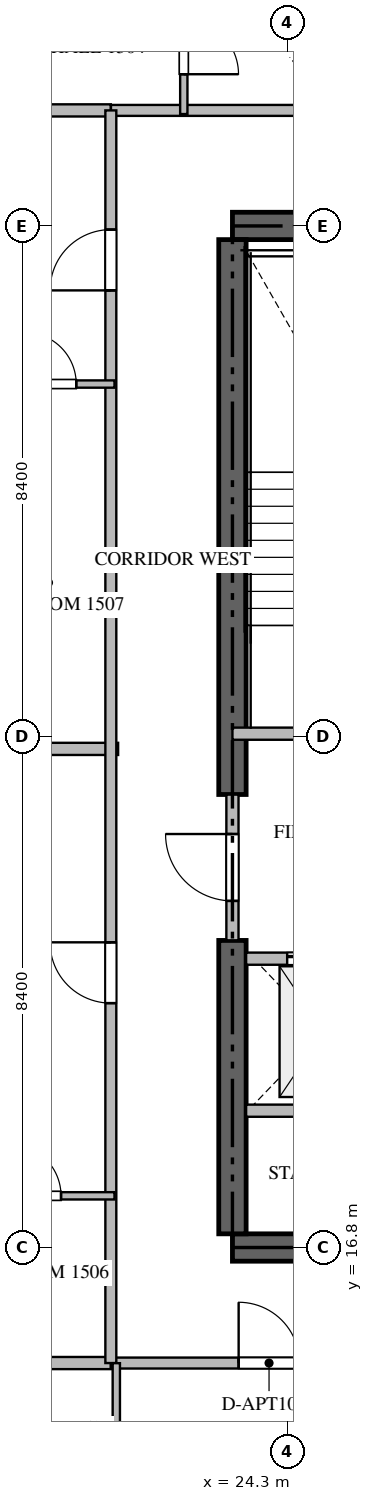
"""IFC4 building model, lengths in metres.
Left out: names, types, materials, properties, quantities, classifications, styles, units other than length and angle.
Written with IfcOpenShell. Run it as: python <this file> out.ifc"""

import sys

from ifc_helpers import new_model, si_unit, direction, frame, frame_2d, origin, place, context, subcontext, project, spatial, rectangle, extrude, source, transform, mapped, element, fill, save


model = new_model("IFC4")
c1 = context("Model", 3, precision=1e-05, world=origin(), true_north=direction((0.0, 1.0)))
c2 = subcontext(c1, "Body", "Model", "MODEL_VIEW")
j1 = project(units=[si_unit("LENGTHUNIT", "METRE"), si_unit("PLANEANGLEUNIT", "RADIAN")], contexts=[c1])
p1 = place(None, origin())
s1 = spatial("IfcSite", under=j1, at=p1, CompositionType="ELEMENT")
p2 = place(p1, origin())
s2 = spatial("IfcBuilding", under=s1, at=p2, CompositionType="ELEMENT")
p3 = place(p2, frame((0.0, 0.0, 64.2)))
s3 = spatial("IfcBuildingStorey", under=s2, at=p3, CompositionType="ELEMENT", Elevation=64.2)
for number, where, z_axis, x_axis in (
    (1, (23.4, 16.8, -0.26), (0.0, 0.0, 1.0), (1.0, 0.0, 0.0)),
    (2, (41.4, 33.6, -0.26), (0.0, 0.0, 1.0), (-1.0, 0.0, 0.0)),
):
    element("IfcWall", number, at=place(p3, frame(where, z_axis=z_axis, x_axis=x_axis)), inside=s3, PredefinedType="SHEAR", context=c2, shape_type="SweptSolid", body=[
        extrude(rectangle(XDim=18.0, YDim=0.45, at=frame_2d((9.0, 0.0))), origin(), (0.0, 0.0, 1.0), 3.748),
    ])
p4 = place(p3, frame((23.4, 17.025, -0.26), z_axis=(0.0, 0.0, 1.0), x_axis=(0.0, 1.0, 0.0)))
e3 = element("IfcWall", 3, at=p4, inside=s3, PredefinedType="SHEAR", context=c2, shape_type="SweptSolid", body=[
    extrude(rectangle(XDim=4.825, YDim=0.45, at=frame_2d((2.413, 0.0))), origin(), (0.0, 0.0, 1.0), 3.748),
])
p5 = place(p3, frame((23.4, 24.25, -0.26), z_axis=(0.0, 0.0, 1.0), x_axis=(0.0, 1.0, 0.0)))
e4 = element("IfcWall", 4, at=p5, inside=s3, PredefinedType="SHEAR", context=c2, shape_type="SweptSolid", body=[
    extrude(rectangle(XDim=9.125, YDim=0.45, at=frame_2d((4.562, 0.0))), origin(), (0.0, 0.0, 1.0), 3.748),
])
p6 = place(p3, frame((23.4, 25.25, 0.0), z_axis=(0.0, 0.0, 1.0), x_axis=(1.0, 0.0, 0.0)))
e5 = element("IfcWall", 5, at=p6, inside=s3, PredefinedType="STANDARD", context=c2, shape_type="SweptSolid", body=[
    extrude(rectangle(XDim=4.45, YDim=0.2, at=frame_2d((2.225, 0.0))), origin(), (0.0, 0.0, 1.0), 3.49),
])
p7 = place(p6, frame((1.65, 0.0, 0.0)))
e6 = element("IfcOpeningElement", 6, at=p7, cuts=e5, PredefinedType="OPENING", context=c2, shape_type="SweptSolid", body=[
    extrude(rectangle(XDim=1.1, YDim=2.15, at=frame_2d((0.55, 1.075))), frame((0.0, 0.11, 0.0), z_axis=(0.0, -1.0, 0.0), x_axis=(1.0, 0.0, 0.0)), (0.0, 0.0, 1.0), 0.22),
])
p8 = place(p3, frame((23.625, 21.55, 0.0), z_axis=(0.0, 0.0, 1.0), x_axis=(1.0, 0.0, 0.0)))
e7 = element("IfcWall", 7, at=p8, inside=s3, PredefinedType="STANDARD", context=c2, shape_type="SweptSolid", body=[
    extrude(rectangle(XDim=2.425, YDim=0.2, at=frame_2d((1.212, 0.0))), origin(), (0.0, 0.0, 1.0), 3.49),
])
p9 = place(p8, frame((0.675, 0.0, 0.0)))
e8 = element("IfcOpeningElement", 8, at=p9, cuts=e7, PredefinedType="OPENING", context=c2, shape_type="SweptSolid", body=[
    extrude(rectangle(XDim=1.2, YDim=2.2, at=frame_2d((0.6, 1.1))), frame((0.0, 0.11, 0.0), z_axis=(0.0, -1.0, 0.0), x_axis=(1.0, 0.0, 0.0)), (0.0, 0.0, 1.0), 0.22),
])
p10 = place(p3, frame((23.625, 19.05, 0.0), z_axis=(0.0, 0.0, 1.0), x_axis=(1.0, 0.0, 0.0)))
e9 = element("IfcWall", 9, at=p10, inside=s3, PredefinedType="STANDARD", context=c2, shape_type="SweptSolid", body=[
    extrude(rectangle(XDim=2.425, YDim=0.2, at=frame_2d((1.212, 0.0))), origin(), (0.0, 0.0, 1.0), 3.49),
])
p11 = place(p3, frame((23.4, 21.852, 0.0), z_axis=(0.0, 0.0, 1.0), x_axis=(0.0, 1.0, 0.0)))
e10 = element("IfcWall", 10, at=p11, inside=s3, PredefinedType="STANDARD", context=c2, shape_type="SweptSolid", body=[
    extrude(rectangle(XDim=2.396, YDim=0.2, at=frame_2d((1.198, 0.0))), origin(), (0.0, 0.0, 1.0), 3.49),
])
p12 = place(p11, frame((0.648, 0.0, 0.0)))
e11 = element("IfcOpeningElement", 11, at=p12, cuts=e10, PredefinedType="OPENING", context=c2, shape_type="SweptSolid", body=[
    extrude(rectangle(XDim=1.1, YDim=2.15, at=frame_2d((0.55, 1.075))), frame((0.0, 0.11, 0.0), z_axis=(0.0, -1.0, 0.0), x_axis=(1.0, 0.0, 0.0)), (0.0, 0.0, 1.0), 0.22),
])
p13 = place(p3, frame((6.082, 25.0, 0.0), z_axis=(0.0, 0.0, 1.0), x_axis=(1.0, 0.0, 0.0)))
e12 = element("IfcWall", 12, at=p13, inside=s3, PredefinedType="PARTITIONING", context=c2, shape_type="SweptSolid", body=[
    extrude(rectangle(XDim=15.438, YDim=0.2, at=frame_2d((7.719, 0.0))), origin(), (0.0, 0.0, 1.0), 3.49),
])
for number, where, z_axis, x_axis in (
    (13, (6.082, 14.9, 0.0), (0.0, 0.0, 1.0), (1.0, 0.0, 0.0)),
    (14, (6.082, 35.5, 0.0), (0.0, 0.0, 1.0), (1.0, 0.0, 0.0)),
):
    element("IfcWall", number, at=place(p3, frame(where, z_axis=z_axis, x_axis=x_axis)), inside=s3, PredefinedType="PARTITIONING", context=c2, shape_type="SweptSolid", body=[
        extrude(rectangle(XDim=15.318, YDim=0.2, at=frame_2d((7.659, 0.0))), origin(), (0.0, 0.0, 1.0), 3.49),
    ])
p14 = place(p3, frame((21.402, 14.9, 0.0), z_axis=(0.0, 0.0, 1.0), x_axis=(1.0, 0.0, 0.0)))
e15 = element("IfcWall", 15, at=p14, inside=s3, PredefinedType="PARTITIONING", context=c2, shape_type="SweptSolid", body=[
    extrude(rectangle(XDim=21.996, YDim=0.18, at=frame_2d((10.998, 0.0))), origin(), (0.0, 0.0, 1.0), 3.49),
])
p15 = place(p14, frame((2.1, 0.0, 0.0)))
e16 = element("IfcOpeningElement", 16, at=p15, cuts=e15, PredefinedType="OPENING", context=c2, shape_type="SweptSolid", body=[
    extrude(rectangle(XDim=1.0, YDim=2.15, at=frame_2d((0.5, 1.075))), frame((0.0, 0.1, 0.0), z_axis=(0.0, -1.0, 0.0), x_axis=(1.0, 0.0, 0.0)), (0.0, 0.0, 1.0), 0.2),
])
p16 = place(p14, frame((6.719, 0.0, 0.0)))
e17 = element("IfcOpeningElement", 17, at=p16, cuts=e15, PredefinedType="OPENING", context=c2, shape_type="SweptSolid", body=[
    extrude(rectangle(XDim=1.0, YDim=2.15, at=frame_2d((0.5, 1.075))), frame((0.0, 0.1, 0.0), z_axis=(0.0, -1.0, 0.0), x_axis=(1.0, 0.0, 0.0)), (0.0, 0.0, 1.0), 0.2),
])
p17 = place(p14, frame((18.896, 0.0, 0.0)))
e18 = element("IfcOpeningElement", 18, at=p17, cuts=e15, PredefinedType="OPENING", context=c2, shape_type="SweptSolid", body=[
    extrude(rectangle(XDim=1.0, YDim=2.15, at=frame_2d((0.5, 1.075))), frame((0.0, 0.1, 0.0), z_axis=(0.0, -1.0, 0.0), x_axis=(1.0, 0.0, 0.0)), (0.0, 0.0, 1.0), 0.2),
])
p18 = place(p3, frame((21.402, 35.5, 0.0), z_axis=(0.0, 0.0, 1.0), x_axis=(1.0, 0.0, 0.0)))
e19 = element("IfcWall", 19, at=p18, inside=s3, PredefinedType="PARTITIONING", context=c2, shape_type="SweptSolid", body=[
    extrude(rectangle(XDim=21.996, YDim=0.18, at=frame_2d((10.998, 0.0))), origin(), (0.0, 0.0, 1.0), 3.49),
])
p19 = place(p18, frame((6.425, 0.0, 0.0)))
e20 = element("IfcOpeningElement", 20, at=p19, cuts=e19, PredefinedType="OPENING", context=c2, shape_type="SweptSolid", body=[
    extrude(rectangle(XDim=1.0, YDim=2.15, at=frame_2d((0.5, 1.075))), frame((0.0, 0.1, 0.0), z_axis=(0.0, -1.0, 0.0), x_axis=(1.0, 0.0, 0.0)), (0.0, 0.0, 1.0), 0.2),
])
p20 = place(p18, frame((13.605, 0.0, 0.0)))
e21 = element("IfcOpeningElement", 21, at=p20, cuts=e19, PredefinedType="OPENING", context=c2, shape_type="SweptSolid", body=[
    extrude(rectangle(XDim=1.0, YDim=2.15, at=frame_2d((0.5, 1.075))), frame((0.0, 0.1, 0.0), z_axis=(0.0, -1.0, 0.0), x_axis=(1.0, 0.0, 0.0)), (0.0, 0.0, 1.0), 0.2),
])
p21 = place(p3, frame((21.4, 14.9, 0.0), z_axis=(0.0, 0.0, 1.0), x_axis=(0.0, 1.0, 0.0)))
e22 = element("IfcWall", 22, at=p21, inside=s3, PredefinedType="PARTITIONING", context=c2, shape_type="SweptSolid", body=[
    extrude(rectangle(XDim=20.6, YDim=0.18, at=frame_2d((10.3, 0.0))), origin(), (0.0, 0.0, 1.0), 3.49),
])
p22 = place(p21, frame((5.919, 0.0, 0.0)))
e23 = element("IfcOpeningElement", 23, at=p22, cuts=e22, PredefinedType="OPENING", context=c2, shape_type="SweptSolid", body=[
    extrude(rectangle(XDim=1.0, YDim=2.15, at=frame_2d((0.5, 1.075))), frame((0.0, 0.1, 0.0), z_axis=(0.0, -1.0, 0.0), x_axis=(1.0, 0.0, 0.0)), (0.0, 0.0, 1.0), 0.2),
])
p23 = place(p21, frame((17.64, 0.0, 0.0)))
e24 = element("IfcOpeningElement", 24, at=p23, cuts=e22, PredefinedType="OPENING", context=c2, shape_type="SweptSolid", body=[
    extrude(rectangle(XDim=1.0, YDim=2.15, at=frame_2d((0.5, 1.075))), frame((0.0, 0.1, 0.0), z_axis=(0.0, -1.0, 0.0), x_axis=(1.0, 0.0, 0.0)), (0.0, 0.0, 1.0), 0.2),
])
p24 = place(p3, frame((21.49, 12.15, 0.0), z_axis=(0.0, 0.0, 1.0), x_axis=(0.0, 1.0, 0.0)))
e25 = element("IfcWall", 25, at=p24, inside=s3, PredefinedType="PARTITIONING", context=c2, shape_type="SweptSolid", body=[
    extrude(rectangle(XDim=2.748, YDim=0.12, at=frame_2d((1.374, 0.0))), origin(), (0.0, 0.0, 1.0), 3.49),
])
p25 = place(p3, frame((22.6, 37.65, 0.0), z_axis=(0.0, 0.0, 1.0), x_axis=(0.0, -1.0, 0.0)))
e26 = element("IfcWall", 26, at=p25, inside=s3, PredefinedType="PARTITIONING", context=c2, shape_type="SweptSolid", body=[
    extrude(rectangle(XDim=2.21, YDim=0.12, at=frame_2d((1.105, 0.0))), origin(), (0.0, 0.0, 1.0), 3.49),
])
p26 = place(p25, frame((0.655, 0.0, 0.0)))
e27 = element("IfcOpeningElement", 27, at=p26, cuts=e26, PredefinedType="OPENING", context=c2, shape_type="SweptSolid", body=[
    extrude(rectangle(XDim=0.9, YDim=2.1, at=frame_2d((0.45, 1.05))), frame((0.0, 0.07, 0.0), z_axis=(0.0, -1.0, 0.0), x_axis=(1.0, 0.0, 0.0)), (0.0, 0.0, 1.0), 0.14),
])
p27 = place(p3, frame((18.852, 17.65, 0.0), z_axis=(0.0, 0.0, 1.0), x_axis=(1.0, 0.0, 0.0)))
e28 = element("IfcWall", 28, at=p27, inside=s3, PredefinedType="PARTITIONING", context=c2, shape_type="SweptSolid", body=[
    extrude(rectangle(XDim=2.608, YDim=0.12, at=frame_2d((1.304, 0.0))), origin(), (0.0, 0.0, 1.0), 3.49),
])
p28 = place(p27, frame((0.879, 0.0, 0.0)))
e29 = element("IfcOpeningElement", 29, at=p28, cuts=e28, PredefinedType="OPENING", context=c2, shape_type="SweptSolid", body=[
    extrude(rectangle(XDim=0.85, YDim=2.1, at=frame_2d((0.425, 1.05))), frame((0.0, 0.07, 0.0), z_axis=(0.0, -1.0, 0.0), x_axis=(1.0, 0.0, 0.0)), (0.0, 0.0, 1.0), 0.14),
])
p29 = place(p3, frame((19.352, 31.0, 0.0), z_axis=(0.0, 0.0, 1.0), x_axis=(1.0, 0.0, 0.0)))
e30 = element("IfcWall", 30, at=p29, inside=s3, PredefinedType="PARTITIONING", context=c2, shape_type="SweptSolid", body=[
    extrude(rectangle(XDim=2.108, YDim=0.12, at=frame_2d((1.054, 0.0))), origin(), (0.0, 0.0, 1.0), 3.49),
])
p30 = place(p29, frame((0.629, 0.0, 0.0)))
e31 = element("IfcOpeningElement", 31, at=p30, cuts=e30, PredefinedType="OPENING", context=c2, shape_type="SweptSolid", body=[
    extrude(rectangle(XDim=0.85, YDim=2.1, at=frame_2d((0.425, 1.05))), frame((0.0, 0.07, 0.0), z_axis=(0.0, -1.0, 0.0), x_axis=(1.0, 0.0, 0.0)), (0.0, 0.0, 1.0), 0.14),
])
m1 = source(origin(), c2, "Body", "SweptSolid", [
    extrude(rectangle(XDim=1.2, YDim=2.2, at=frame_2d((0.6, 1.1))), frame((0.0, 0.025, 0.0), z_axis=(0.0, -1.0, 0.0), x_axis=(1.0, 0.0, 0.0)), (0.0, 0.0, 1.0), 0.05),
])
p31 = place(p9, origin())
e32 = element("IfcDoor", 32, at=p31, inside=s3, OperationType="DOUBLE_DOOR_SLIDING", PredefinedType="DOOR", context=c2, shape_type="MappedRepresentation", body=[
    mapped(m1, transform((0.0, 0.0, 0.0), scale=1.0)),
])
fill(e8, e32)
m2 = source(origin(), c2, "Body", "SweptSolid", [
    extrude(rectangle(XDim=1.1, YDim=2.15, at=frame_2d((0.55, 1.075))), frame((0.0, 0.025, 0.0), z_axis=(0.0, -1.0, 0.0), x_axis=(1.0, 0.0, 0.0)), (0.0, 0.0, 1.0), 0.05),
])
p32 = place(p12, origin())
e33 = element("IfcDoor", 33, at=p32, inside=s3, OperationType="SINGLE_SWING_RIGHT", PredefinedType="DOOR", context=c2, shape_type="MappedRepresentation", body=[
    mapped(m2, transform((0.0, 0.0, 0.0), scale=1.0)),
])
fill(e11, e33)
m3 = source(origin(), c2, "Body", "SweptSolid", [
    extrude(rectangle(XDim=1.0, YDim=2.15, at=frame_2d((0.5, 1.075))), frame((0.0, 0.025, 0.0), z_axis=(0.0, -1.0, 0.0), x_axis=(1.0, 0.0, 0.0)), (0.0, 0.0, 1.0), 0.05),
])
p33 = place(p15, origin())
e34 = element("IfcDoor", 34, at=p33, inside=s3, OperationType="SINGLE_SWING_LEFT", PredefinedType="DOOR", context=c2, shape_type="MappedRepresentation", body=[
    mapped(m3, transform((0.0, 0.0, 0.0), scale=1.0)),
])
fill(e16, e34)
p34 = place(p22, origin())
e35 = element("IfcDoor", 35, at=p34, inside=s3, OperationType="SINGLE_SWING_RIGHT", PredefinedType="DOOR", context=c2, shape_type="MappedRepresentation", body=[
    mapped(m3, transform((0.0, 0.0, 0.0), scale=1.0)),
])
fill(e23, e35)
p35 = place(p23, origin())
e36 = element("IfcDoor", 36, at=p35, inside=s3, OperationType="SINGLE_SWING_LEFT", PredefinedType="DOOR", context=c2, shape_type="MappedRepresentation", body=[
    mapped(m3, transform((0.0, 0.0, 0.0), scale=1.0)),
])
fill(e24, e36)
m4 = source(origin(), c2, "Body", "SweptSolid", [
    extrude(rectangle(XDim=0.9, YDim=2.1, at=frame_2d((0.45, 1.05))), frame((0.0, 0.025, 0.0), z_axis=(0.0, -1.0, 0.0), x_axis=(1.0, 0.0, 0.0)), (0.0, 0.0, 1.0), 0.05),
])
p36 = place(p26, origin())
e37 = element("IfcDoor", 37, at=p36, inside=s3, OperationType="SINGLE_SWING_RIGHT", PredefinedType="DOOR", context=c2, shape_type="MappedRepresentation", body=[
    mapped(m4, transform((0.0, 0.0, 0.0), scale=1.0)),
])
fill(e27, e37)
m5 = source(origin(), c2, "Body", "SweptSolid", [
    extrude(rectangle(XDim=0.85, YDim=2.1, at=frame_2d((0.425, 1.05))), frame((0.0, 0.025, 0.0), z_axis=(0.0, -1.0, 0.0), x_axis=(1.0, 0.0, 0.0)), (0.0, 0.0, 1.0), 0.05),
])
p37 = place(p28, origin())
e38 = element("IfcDoor", 38, at=p37, inside=s3, OperationType="SINGLE_SWING_LEFT", PredefinedType="DOOR", context=c2, shape_type="MappedRepresentation", body=[
    mapped(m5, transform((0.0, 0.0, 0.0), scale=1.0)),
])
fill(e29, e38)
p38 = place(p30, origin())
e39 = element("IfcDoor", 39, at=p38, inside=s3, OperationType="SINGLE_SWING_LEFT", PredefinedType="DOOR", context=c2, shape_type="MappedRepresentation", body=[
    mapped(m5, transform((0.0, 0.0, 0.0), scale=1.0)),
])
fill(e31, e39)
save(model, sys.argv[1])
